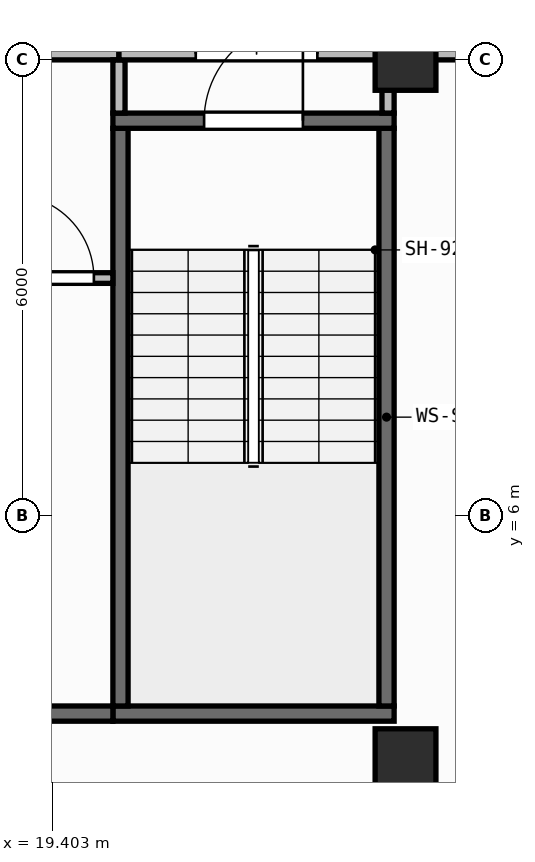
"""IFC4 building model, lengths in metres.
Left out: names, types, materials, properties, quantities, classifications, styles, units other than length and angle.
Written with IfcOpenShell. Run it as: python <this file> out.ifc"""

import sys

from ifc_helpers import new_model, si_unit, direction, frame, frame_2d, origin, origin_2d, place, context, subcontext, project, spatial, rectangle, extrude, element, fill, save


model = new_model("IFC4")
c1 = context("Model", 3, precision=1e-05, world=origin(), true_north=direction((0.0, 1.0)))
c2 = subcontext(c1, "Body", "Model", "MODEL_VIEW")
j1 = project(units=[si_unit("LENGTHUNIT", "METRE"), si_unit("PLANEANGLEUNIT", "RADIAN")], contexts=[c1])
p1 = place(None, origin())
s1 = spatial("IfcSite", under=j1, at=p1, CompositionType="ELEMENT")
p2 = place(p1, origin())
s2 = spatial("IfcBuilding", under=s1, at=p2, CompositionType="ELEMENT")
p3 = place(p2, frame((0.0, 0.0, 240.75)))
s3 = spatial("IfcBuildingStorey", under=s2, at=p3, CompositionType="ELEMENT", Elevation=240.75)
for number, where, z_axis, x_axis in (
    (1, (24.05, 2.8, 0.0), (0.0, 0.0, 1.0), (1.0, 0.0, 0.0)),
    (2, (24.05, 12.0, 0.0), (0.0, 0.0, 1.0), (1.0, 0.0, 0.0)),
):
    element("IfcColumn", number, at=place(p3, frame(where, z_axis=z_axis, x_axis=x_axis)), inside=s3, PredefinedType="COLUMN", context=c2, shape_type="SweptSolid", body=[
        extrude(rectangle(XDim=0.8, YDim=0.8, at=origin_2d()), origin(), (0.0, 0.0, 1.0), 3.95),
    ])
p4 = place(p3, frame((2.66, 0.174, 0.0), z_axis=(0.0, 0.0, 1.0), x_axis=(0.996611813627, 0.082248969229, 0.0)))
e3 = element("IfcWall", 3, at=p4, inside=s3, PredefinedType="STANDARD", context=c2, shape_type="SweptSolid", body=[
    extrude(rectangle(XDim=41.019, YDim=0.26, at=frame_2d((20.51, 0.0))), origin(), (0.0, 0.0, 1.0), 3.71),
])
p5 = place(p4, frame((19.31, 0.0, 0.9)))
e4 = element("IfcOpeningElement", 4, at=p5, cuts=e3, PredefinedType="OPENING", context=c2, shape_type="SweptSolid", body=[
    extrude(rectangle(XDim=2.4, YDim=1.65, at=frame_2d((1.2, 0.825))), frame((0.0, 0.14, 0.0), z_axis=(0.0, -1.0, 0.0), x_axis=(1.0, 0.0, 0.0)), (0.0, 0.0, 1.0), 0.28),
])
p6 = place(p3, frame((20.2, 3.4, 0.0), z_axis=(0.0, 0.0, 1.0), x_axis=(1.0, 0.0, 0.0)))
e5 = element("IfcWall", 5, at=p6, inside=s3, PredefinedType="SHEAR", context=c2, shape_type="SweptSolid", body=[
    extrude(rectangle(XDim=3.7, YDim=0.2, at=frame_2d((1.85, 0.0))), origin(), (0.0, 0.0, 1.0), 3.71),
])
for number, where, z_axis, x_axis in (
    (6, (20.3, 3.5, 0.0), (0.0, 0.0, 1.0), (0.0, 1.0, 0.0)),
    (7, (23.8, 3.5, 0.0), (0.0, 0.0, 1.0), (0.0, 1.0, 0.0)),
):
    element("IfcWall", number, at=place(p3, frame(where, z_axis=z_axis, x_axis=x_axis)), inside=s3, PredefinedType="SHEAR", context=c2, shape_type="SweptSolid", body=[
        extrude(rectangle(XDim=7.6, YDim=0.2, at=frame_2d((3.8, 0.0))), origin(), (0.0, 0.0, 1.0), 3.71),
    ])
p7 = place(p3, frame((20.2, 11.2, 0.0), z_axis=(0.0, 0.0, 1.0), x_axis=(1.0, 0.0, 0.0)))
e8 = element("IfcWall", 8, at=p7, inside=s3, PredefinedType="SHEAR", context=c2, shape_type="SweptSolid", body=[
    extrude(rectangle(XDim=3.7, YDim=0.2, at=frame_2d((1.85, 0.0))), origin(), (0.0, 0.0, 1.0), 3.71),
])
p8 = place(p7, frame((1.2, 0.0, 0.0)))
e9 = element("IfcOpeningElement", 9, at=p8, cuts=e8, PredefinedType="OPENING", context=c2, shape_type="SweptSolid", body=[
    extrude(rectangle(XDim=1.3, YDim=2.15, at=frame_2d((0.65, 1.075))), frame((0.0, 0.11, 0.0), z_axis=(0.0, -1.0, 0.0), x_axis=(1.0, 0.0, 0.0)), (0.0, 0.0, 1.0), 0.22),
])
p9 = place(p3, frame((6.5, 3.4, 0.0), z_axis=(0.0, 0.0, 1.0), x_axis=(1.0, 0.0, 0.0)))
e10 = element("IfcWall", 10, at=p9, inside=s3, PredefinedType="SHEAR", context=c2, shape_type="SweptSolid", body=[
    extrude(rectangle(XDim=13.7, YDim=0.2, at=frame_2d((6.85, 0.0))), origin(), (0.0, 0.0, 1.0), 3.71),
])
p10 = place(p3, frame((18.61, 9.13, 0.0), z_axis=(0.0, 0.0, 1.0), x_axis=(1.0, 0.0, 0.0)))
e11 = element("IfcWall", 11, at=p10, inside=s3, PredefinedType="PARTITIONING", context=c2, shape_type="SweptSolid", body=[
    extrude(rectangle(XDim=1.59, YDim=0.14, at=frame_2d((0.795, 0.0))), origin(), (0.0, 0.0, 1.0), 3.71),
])
p11 = place(p10, frame((0.24, 0.0, 0.0)))
e12 = element("IfcOpeningElement", 12, at=p11, cuts=e11, PredefinedType="OPENING", context=c2, shape_type="SweptSolid", body=[
    extrude(rectangle(XDim=1.1, YDim=2.1, at=frame_2d((0.55, 1.05))), frame((0.0, 0.08, 0.0), z_axis=(0.0, -1.0, 0.0), x_axis=(1.0, 0.0, 0.0)), (0.0, 0.0, 1.0), 0.16),
])
p12 = place(p3, frame((12.58, 12.08, 0.0), z_axis=(0.0, 0.0, 1.0), x_axis=(1.0, 0.0, 0.0)))
e13 = element("IfcWall", 13, at=p12, inside=s3, PredefinedType="PARTITIONING", context=c2, shape_type="SweptSolid", body=[
    extrude(rectangle(XDim=7.7, YDim=0.16, at=frame_2d((3.85, 0.0))), origin(), (0.0, 0.0, 1.0), 3.157),
])
p13 = place(p12, frame((3.05, 0.0, 0.0)))
e14 = element("IfcOpeningElement", 14, at=p13, cuts=e13, PredefinedType="OPENING", context=c2, shape_type="SweptSolid", body=[
    extrude(rectangle(XDim=1.6, YDim=2.05, at=frame_2d((0.8, 1.025))), frame((0.0, 0.09, 0.0), z_axis=(0.0, -1.0, 0.0), x_axis=(1.0, 0.0, 0.0)), (0.0, 0.0, 1.0), 0.18),
])
p14 = place(p3, frame((20.28, 11.3, 0.0), z_axis=(0.0, 0.0, 1.0), x_axis=(0.0, 1.0, 0.0)))
e15 = element("IfcWall", 15, at=p14, inside=s3, PredefinedType="PARTITIONING", context=c2, shape_type="SweptSolid", body=[
    extrude(rectangle(XDim=0.7, YDim=0.16, at=frame_2d((0.35, 0.0))), origin(), (0.0, 0.0, 1.0), 3.71),
])
p15 = place(p3, frame((20.28, 12.08, 0.0), z_axis=(0.0, 0.0, 1.0), x_axis=(1.0, 0.0, 0.0)))
e16 = element("IfcWall", 16, at=p15, inside=s3, PredefinedType="PARTITIONING", context=c2, shape_type="SweptSolid", body=[
    extrude(rectangle(XDim=3.62, YDim=0.16, at=frame_2d((1.81, 0.0))), origin(), (0.0, 0.0, 1.0), 3.157),
])
p16 = place(p15, frame((1.01, 0.0, 0.0)))
e17 = element("IfcOpeningElement", 17, at=p16, cuts=e16, PredefinedType="OPENING", context=c2, shape_type="SweptSolid", body=[
    extrude(rectangle(XDim=1.6, YDim=2.05, at=frame_2d((0.8, 1.025))), frame((0.0, 0.09, 0.0), z_axis=(0.0, -1.0, 0.0), x_axis=(1.0, 0.0, 0.0)), (0.0, 0.0, 1.0), 0.18),
])
p17 = place(p3, frame((23.82, 11.3, 0.0), z_axis=(0.0, 0.0, 1.0), x_axis=(0.0, 1.0, 0.0)))
e18 = element("IfcWall", 18, at=p17, inside=s3, PredefinedType="PARTITIONING", context=c2, shape_type="SweptSolid", body=[
    extrude(rectangle(XDim=0.7, YDim=0.16, at=frame_2d((0.35, 0.0))), origin(), (0.0, 0.0, 1.0), 3.71),
])
p18 = place(p3, frame((24.02, 12.08, 0.0), z_axis=(0.0, 0.0, 1.0), x_axis=(1.0, 0.0, 0.0)))
e19 = element("IfcWall", 19, at=p18, inside=s3, PredefinedType="PARTITIONING", context=c2, shape_type="SweptSolid", body=[
    extrude(rectangle(XDim=1.218, YDim=0.16, at=frame_2d((0.609, 0.0))), origin(), (0.0, 0.0, 1.0), 3.157),
])
p19 = place(p8, origin())
e20 = element("IfcDoor", 20, at=p19, inside=s3, OperationType="SINGLE_SWING_RIGHT", PredefinedType="DOOR", context=c2, shape_type="SweptSolid", body=[
    extrude(rectangle(XDim=1.3, YDim=2.15, at=frame_2d((0.65, 1.075))), frame((0.0, 0.025, 0.0), z_axis=(0.0, -1.0, 0.0), x_axis=(1.0, 0.0, 0.0)), (0.0, 0.0, 1.0), 0.05),
])
fill(e9, e20)
p20 = place(p11, origin())
e21 = element("IfcDoor", 21, at=p20, inside=s3, OperationType="SINGLE_SWING_LEFT", PredefinedType="DOOR", context=c2, shape_type="SweptSolid", body=[
    extrude(rectangle(XDim=1.1, YDim=2.1, at=frame_2d((0.55, 1.05))), frame((0.0, 0.025, 0.0), z_axis=(0.0, -1.0, 0.0), x_axis=(1.0, 0.0, 0.0)), (0.0, 0.0, 1.0), 0.05),
])
fill(e12, e21)
p21 = place(p16, origin())
e22 = element("IfcDoor", 22, at=p21, inside=s3, OperationType="DOUBLE_DOOR_SINGLE_SWING", PredefinedType="DOOR", context=c2, shape_type="SweptSolid", body=[
    extrude(rectangle(XDim=1.6, YDim=2.05, at=frame_2d((0.8, 1.025))), frame((0.0, 0.025, 0.0), z_axis=(0.0, -1.0, 0.0), x_axis=(1.0, 0.0, 0.0)), (0.0, 0.0, 1.0), 0.05),
])
fill(e17, e22)
save(model, sys.argv[1])
